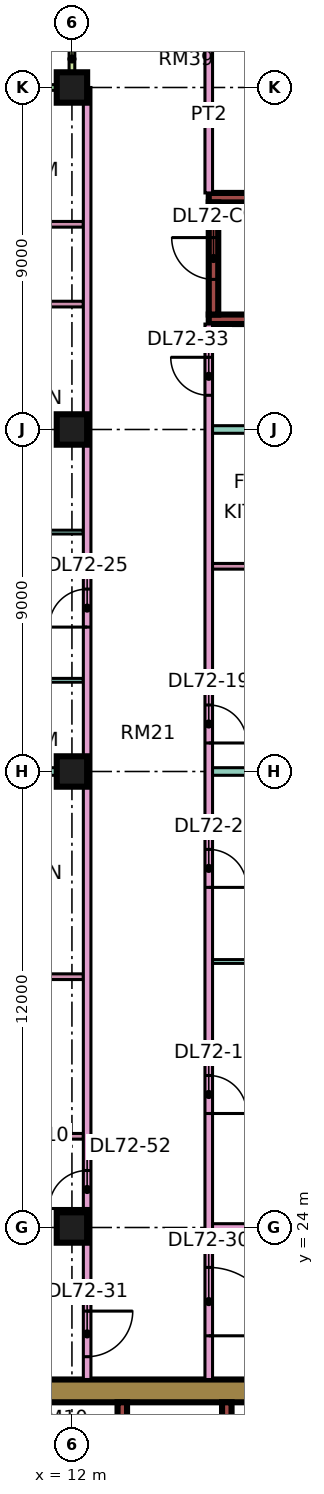
"""IFC4 building model, lengths in metres.
Left out: names, types, materials, properties, quantities, classifications, styles, units other than length and angle.
Written with IfcOpenShell. Run it as: python <this file> out.ifc"""

import sys

from ifc_helpers import new_model, si_unit, direction, frame, frame_2d, origin, origin_2d, place, context, subcontext, project, spatial, rectangle, extrude, element, fill, save


model = new_model("IFC4")
c1 = context("Model", 3, precision=1e-05, world=origin(), true_north=direction((0.0, 1.0)))
c2 = subcontext(c1, "Body", "Model", "MODEL_VIEW")
j1 = project(units=[si_unit("LENGTHUNIT", "METRE"), si_unit("PLANEANGLEUNIT", "RADIAN")], contexts=[c1])
p1 = place(None, origin())
s1 = spatial("IfcSite", under=j1, at=p1, CompositionType="ELEMENT")
p2 = place(p1, origin())
s2 = spatial("IfcBuilding", under=s1, at=p2, CompositionType="ELEMENT")
p3 = place(p2, frame((0.0, 0.0, 307.15)))
s3 = spatial("IfcBuildingStorey", under=s2, at=p3, CompositionType="ELEMENT", Elevation=307.15)
for number, where, z_axis, x_axis in (
    (1, (12.0, 24.0, 0.0), (0.0, 0.0, 1.0), (1.0, 0.0, 0.0)),
    (2, (12.0, 36.0, 0.0), (0.0, 0.0, 1.0), (1.0, 0.0, 0.0)),
    (3, (12.0, 45.0, 0.0), (0.0, 0.0, 1.0), (1.0, 0.0, 0.0)),
    (4, (12.0, 54.0, 0.0), (0.0, 0.0, 1.0), (1.0, 0.0, 0.0)),
):
    element("IfcColumn", number, at=place(p3, frame(where, z_axis=z_axis, x_axis=x_axis)), inside=s3, PredefinedType="COLUMN", context=c2, shape_type="SweptSolid", body=[
        extrude(rectangle(XDim=0.8, YDim=0.8, at=origin_2d()), origin(), (0.0, 0.0, 1.0), 3.75),
    ])
p4 = place(p3, frame((9.0, 19.7, 0.0), z_axis=(0.0, 0.0, 1.0), x_axis=(1.0, 0.0, 0.0)))
e5 = element("IfcWall", 5, at=p4, inside=s3, PredefinedType="SHEAR", context=c2, shape_type="SweptSolid", body=[
    extrude(rectangle(XDim=25.0, YDim=0.6, at=frame_2d((12.5, 0.0))), origin(), (0.0, 0.0, 1.0), 3.75),
])
p5 = place(p4, frame((19.1, 0.0, 0.0)))
e6 = element("IfcOpeningElement", 6, at=p5, cuts=e5, PredefinedType="OPENING", context=c2, shape_type="SweptSolid", body=[
    extrude(rectangle(XDim=1.8, YDim=2.4, at=frame_2d((0.9, 1.2))), frame((0.0, 0.31, 0.0), z_axis=(0.0, -1.0, 0.0), x_axis=(1.0, 0.0, 0.0)), (0.0, 0.0, 1.0), 0.62),
])
p6 = place(p3, frame((13.325, 7.6, 0.0), z_axis=(0.0, 0.0, 1.0), x_axis=(0.0, 1.0, 0.0)))
e7 = element("IfcWall", 7, at=p6, inside=s3, PredefinedType="SHEAR", context=c2, shape_type="SweptSolid", body=[
    extrude(rectangle(XDim=11.8, YDim=0.25, at=frame_2d((5.9, 0.0))), origin(), (0.0, 0.0, 1.0), 3.75),
])
p7 = place(p3, frame((16.075, 15.8, 0.0), z_axis=(0.0, 0.0, 1.0), x_axis=(0.0, 1.0, 0.0)))
e8 = element("IfcWall", 8, at=p7, inside=s3, PredefinedType="SHEAR", context=c2, shape_type="SweptSolid", body=[
    extrude(rectangle(XDim=3.6, YDim=0.25, at=frame_2d((1.8, 0.0))), origin(), (0.0, 0.0, 1.0), 3.75),
])
for number, where, z_axis, x_axis in (
    (9, (15.6, 47.9, 0.0), (0.0, 0.0, 1.0), (1.0, 0.0, 0.0)),
    (10, (15.6, 51.1, 0.0), (0.0, 0.0, 1.0), (1.0, 0.0, 0.0)),
):
    element("IfcWall", number, at=place(p3, frame(where, z_axis=z_axis, x_axis=x_axis)), inside=s3, PredefinedType="SHEAR", context=c2, shape_type="SweptSolid", body=[
        extrude(rectangle(XDim=7.0, YDim=0.25, at=frame_2d((3.5, 0.0))), origin(), (0.0, 0.0, 1.0), 3.75),
    ])
p8 = place(p3, frame((15.725, 48.025, 0.0), z_axis=(0.0, 0.0, 1.0), x_axis=(0.0, 1.0, 0.0)))
e11 = element("IfcWall", 11, at=p8, inside=s3, PredefinedType="SHEAR", context=c2, shape_type="SweptSolid", body=[
    extrude(rectangle(XDim=2.95, YDim=0.25, at=frame_2d((1.475, 0.0))), origin(), (0.0, 0.0, 1.0), 3.75),
])
p9 = place(p8, frame((0.925, 0.0, 0.0)))
e12 = element("IfcOpeningElement", 12, at=p9, cuts=e11, PredefinedType="OPENING", context=c2, shape_type="SweptSolid", body=[
    extrude(rectangle(XDim=1.1, YDim=2.2, at=frame_2d((0.55, 1.1))), frame((0.0, 0.135, 0.0), z_axis=(0.0, -1.0, 0.0), x_axis=(1.0, 0.0, 0.0)), (0.0, 0.0, 1.0), 0.27),
])
p10 = place(p3, frame((11.925, 54.0, 0.0), z_axis=(0.0, 0.0, 1.0), x_axis=(-1.0, 0.0, 0.0)))
e13 = element("IfcWall", 13, at=p10, inside=s3, PredefinedType="SOLIDWALL", context=c2, shape_type="SweptSolid", body=[
    extrude(rectangle(XDim=10.35, YDim=0.15, at=frame_2d((5.175, 0.0))), origin(), (0.0, 0.0, 1.0), 3.35),
])
p11 = place(p10, frame((6.738, 0.0, 0.0)))
e14 = element("IfcOpeningElement", 14, at=p11, cuts=e13, PredefinedType="OPENING", context=c2, shape_type="SweptSolid", body=[
    extrude(rectangle(XDim=1.8, YDim=2.4, at=frame_2d((0.9, 1.2))), frame((0.0, 0.085, 0.0), z_axis=(0.0, -1.0, 0.0), x_axis=(1.0, 0.0, 0.0)), (0.0, 0.0, 1.0), 0.17),
])
p12 = place(p3, frame((12.0, 55.5, 0.0), z_axis=(0.0, 0.0, 1.0), x_axis=(0.0, -1.0, 0.0)))
e15 = element("IfcWall", 15, at=p12, inside=s3, PredefinedType="SOLIDWALL", context=c2, shape_type="SweptSolid", body=[
    extrude(rectangle(XDim=1.5, YDim=0.15, at=frame_2d((0.75, 0.0))), origin(), (0.0, 0.0, 1.0), 3.35),
])
p13 = place(p3, frame((-1.35, 22.4, 0.0), z_axis=(0.0, 0.0, 1.0), x_axis=(1.0, 0.0, 0.0)))
e16 = element("IfcWall", 16, at=p13, inside=s3, PredefinedType="PARTITIONING", context=c2, shape_type="SweptSolid", body=[
    extrude(rectangle(XDim=13.65, YDim=0.2, at=frame_2d((6.825, 0.0))), origin(), (0.0, 0.0, 1.0), 3.35),
])
p14 = place(p3, frame((0.0, 36.0, 0.0), z_axis=(0.0, 0.0, 1.0), x_axis=(1.0, 0.0, 0.0)))
e17 = element("IfcWall", 17, at=p14, inside=s3, PredefinedType="PARTITIONING", context=c2, shape_type="SweptSolid", body=[
    extrude(rectangle(XDim=12.3, YDim=0.2, at=frame_2d((6.15, 0.0))), origin(), (0.0, 0.0, 1.0), 3.35),
])
p15 = place(p3, frame((7.075, 26.4, 0.0), z_axis=(0.0, 0.0, 1.0), x_axis=(1.0, 0.0, 0.0)))
e18 = element("IfcWall", 18, at=p15, inside=s3, PredefinedType="PARTITIONING", context=c2, shape_type="SweptSolid", body=[
    extrude(rectangle(XDim=5.225, YDim=0.15, at=frame_2d((2.613, 0.0))), origin(), (0.0, 0.0, 1.0), 3.35),
])
p16 = place(p15, frame((2.275, 0.0, 0.0)))
e19 = element("IfcOpeningElement", 19, at=p16, cuts=e18, PredefinedType="OPENING", context=c2, shape_type="SweptSolid", body=[
    extrude(rectangle(XDim=0.8, YDim=2.1, at=frame_2d((0.4, 1.05))), frame((0.0, 0.085, 0.0), z_axis=(0.0, -1.0, 0.0), x_axis=(1.0, 0.0, 0.0)), (0.0, 0.0, 1.0), 0.17),
])
p17 = place(p3, frame((7.075, 30.6, 0.0), z_axis=(0.0, 0.0, 1.0), x_axis=(1.0, 0.0, 0.0)))
e20 = element("IfcWall", 20, at=p17, inside=s3, PredefinedType="PARTITIONING", context=c2, shape_type="SweptSolid", body=[
    extrude(rectangle(XDim=5.225, YDim=0.15, at=frame_2d((2.613, 0.0))), origin(), (0.0, 0.0, 1.0), 3.35),
])
for number, where, z_axis, x_axis in (
    (21, (7.075, 38.4, 0.0), (0.0, 0.0, 1.0), (1.0, 0.0, 0.0)),
    (22, (7.075, 42.3, 0.0), (0.0, 0.0, 1.0), (1.0, 0.0, 0.0)),
):
    element("IfcWall", number, at=place(p3, frame(where, z_axis=z_axis, x_axis=x_axis)), inside=s3, PredefinedType="PARTITIONING", context=c2, shape_type="SweptSolid", body=[
        extrude(rectangle(XDim=5.225, YDim=0.1, at=frame_2d((2.613, 0.0))), origin(), (0.0, 0.0, 1.0), 3.35),
    ])
for number, where, z_axis, x_axis in (
    (23, (7.075, 48.3, 0.0), (0.0, 0.0, 1.0), (1.0, 0.0, 0.0)),
    (24, (7.075, 50.4, 0.0), (0.0, 0.0, 1.0), (1.0, 0.0, 0.0)),
):
    element("IfcWall", number, at=place(p3, frame(where, z_axis=z_axis, x_axis=x_axis)), inside=s3, PredefinedType="PARTITIONING", context=c2, shape_type="SweptSolid", body=[
        extrude(rectangle(XDim=5.225, YDim=0.15, at=frame_2d((2.613, 0.0))), origin(), (0.0, 0.0, 1.0), 3.35),
    ])
p18 = place(p3, frame((12.4, 20.0, 0.0), z_axis=(0.0, 0.0, 1.0), x_axis=(0.0, 1.0, 0.0)))
e25 = element("IfcWall", 25, at=p18, inside=s3, PredefinedType="PARTITIONING", context=c2, shape_type="SweptSolid", body=[
    extrude(rectangle(XDim=34.0, YDim=0.2, at=frame_2d((17.0, 0.0))), origin(), (0.0, 0.0, 1.0), 3.35),
])
p19 = place(p18, frame((19.8, 0.0, 0.0)))
e26 = element("IfcOpeningElement", 26, at=p19, cuts=e25, PredefinedType="OPENING", context=c2, shape_type="SweptSolid", body=[
    extrude(rectangle(XDim=1.0, YDim=2.1, at=frame_2d((0.5, 1.05))), frame((0.0, 0.11, 0.0), z_axis=(0.0, -1.0, 0.0), x_axis=(1.0, 0.0, 0.0)), (0.0, 0.0, 1.0), 0.22),
])
p20 = place(p18, frame((0.6, 0.0, 0.0)))
e27 = element("IfcOpeningElement", 27, at=p20, cuts=e25, PredefinedType="OPENING", context=c2, shape_type="SweptSolid", body=[
    extrude(rectangle(XDim=1.2, YDim=2.1, at=frame_2d((0.6, 1.05))), frame((0.0, 0.11, 0.0), z_axis=(0.0, -1.0, 0.0), x_axis=(1.0, 0.0, 0.0)), (0.0, 0.0, 1.0), 0.22),
])
p21 = place(p18, frame((4.5, 0.0, 0.0)))
e28 = element("IfcOpeningElement", 28, at=p21, cuts=e25, PredefinedType="OPENING", context=c2, shape_type="SweptSolid", body=[
    extrude(rectangle(XDim=1.0, YDim=2.1, at=frame_2d((0.5, 1.05))), frame((0.0, 0.11, 0.0), z_axis=(0.0, -1.0, 0.0), x_axis=(1.0, 0.0, 0.0)), (0.0, 0.0, 1.0), 0.22),
])
p22 = place(p3, frame((15.6, 20.0, 0.0), z_axis=(0.0, 0.0, 1.0), x_axis=(0.0, 1.0, 0.0)))
e29 = element("IfcWall", 29, at=p22, inside=s3, PredefinedType="PARTITIONING", context=c2, shape_type="SweptSolid", body=[
    extrude(rectangle(XDim=27.775, YDim=0.2, at=frame_2d((13.887, 0.0))), origin(), (0.0, 0.0, 1.0), 3.35),
])
p23 = place(p22, frame((7.0, 0.0, 0.0)))
e30 = element("IfcOpeningElement", 30, at=p23, cuts=e29, PredefinedType="OPENING", context=c2, shape_type="SweptSolid", body=[
    extrude(rectangle(XDim=1.0, YDim=2.1, at=frame_2d((0.5, 1.05))), frame((0.0, 0.11, 0.0), z_axis=(0.0, -1.0, 0.0), x_axis=(1.0, 0.0, 0.0)), (0.0, 0.0, 1.0), 0.22),
])
p24 = place(p22, frame((12.95, 0.0, 0.0)))
e31 = element("IfcOpeningElement", 31, at=p24, cuts=e29, PredefinedType="OPENING", context=c2, shape_type="SweptSolid", body=[
    extrude(rectangle(XDim=1.0, YDim=2.1, at=frame_2d((0.5, 1.05))), frame((0.0, 0.11, 0.0), z_axis=(0.0, -1.0, 0.0), x_axis=(1.0, 0.0, 0.0)), (0.0, 0.0, 1.0), 0.22),
])
p25 = place(p22, frame((16.75, 0.0, 0.0)))
e32 = element("IfcOpeningElement", 32, at=p25, cuts=e29, PredefinedType="OPENING", context=c2, shape_type="SweptSolid", body=[
    extrude(rectangle(XDim=1.0, YDim=2.1, at=frame_2d((0.5, 1.05))), frame((0.0, 0.11, 0.0), z_axis=(0.0, -1.0, 0.0), x_axis=(1.0, 0.0, 0.0)), (0.0, 0.0, 1.0), 0.22),
])
p26 = place(p22, frame((1.15, 0.0, 0.0)))
e33 = element("IfcOpeningElement", 33, at=p26, cuts=e29, PredefinedType="OPENING", context=c2, shape_type="SweptSolid", body=[
    extrude(rectangle(XDim=1.8, YDim=2.1, at=frame_2d((0.9, 1.05))), frame((0.0, 0.11, 0.0), z_axis=(0.0, -1.0, 0.0), x_axis=(1.0, 0.0, 0.0)), (0.0, 0.0, 1.0), 0.22),
])
p27 = place(p22, frame((25.9, 0.0, 0.0)))
e34 = element("IfcOpeningElement", 34, at=p27, cuts=e29, PredefinedType="OPENING", context=c2, shape_type="SweptSolid", body=[
    extrude(rectangle(XDim=1.0, YDim=2.1, at=frame_2d((0.5, 1.05))), frame((0.0, 0.11, 0.0), z_axis=(0.0, -1.0, 0.0), x_axis=(1.0, 0.0, 0.0)), (0.0, 0.0, 1.0), 0.22),
])
p28 = place(p3, frame((15.6, 51.225, 0.0), z_axis=(0.0, 0.0, 1.0), x_axis=(0.0, 1.0, 0.0)))
e35 = element("IfcWall", 35, at=p28, inside=s3, PredefinedType="PARTITIONING", context=c2, shape_type="SweptSolid", body=[
    extrude(rectangle(XDim=4.125, YDim=0.2, at=frame_2d((2.062, 0.0))), origin(), (0.0, 0.0, 1.0), 3.35),
])
p29 = place(p3, frame((15.7, 24.0, 0.0), z_axis=(0.0, 0.0, 1.0), x_axis=(1.0, 0.0, 0.0)))
e36 = element("IfcWall", 36, at=p29, inside=s3, PredefinedType="PARTITIONING", context=c2, shape_type="SweptSolid", body=[
    extrude(rectangle(XDim=5.8, YDim=0.2, at=frame_2d((2.9, 0.0))), origin(), (0.0, 0.0, 1.0), 3.35),
])
p30 = place(p3, frame((15.7, 31.0, 0.0), z_axis=(0.0, 0.0, 1.0), x_axis=(1.0, 0.0, 0.0)))
e37 = element("IfcWall", 37, at=p30, inside=s3, PredefinedType="PARTITIONING", context=c2, shape_type="SweptSolid", body=[
    extrude(rectangle(XDim=5.8, YDim=0.1, at=frame_2d((2.9, 0.0))), origin(), (0.0, 0.0, 1.0), 3.35),
])
p31 = place(p3, frame((15.7, 36.0, 0.0), z_axis=(0.0, 0.0, 1.0), x_axis=(1.0, 0.0, 0.0)))
e38 = element("IfcWall", 38, at=p31, inside=s3, PredefinedType="PARTITIONING", context=c2, shape_type="SweptSolid", body=[
    extrude(rectangle(XDim=8.3, YDim=0.2, at=frame_2d((4.15, 0.0))), origin(), (0.0, 0.0, 1.0), 3.35),
])
for number, where, z_axis, x_axis in (
    (39, (15.7, 38.4, 0.0), (0.0, 0.0, 1.0), (1.0, 0.0, 0.0)),
    (40, (15.7, 41.4, 0.0), (0.0, 0.0, 1.0), (1.0, 0.0, 0.0)),
):
    element("IfcWall", number, at=place(p3, frame(where, z_axis=z_axis, x_axis=x_axis)), inside=s3, PredefinedType="PARTITIONING", context=c2, shape_type="SweptSolid", body=[
        extrude(rectangle(XDim=2.825, YDim=0.15, at=frame_2d((1.413, 0.0))), origin(), (0.0, 0.0, 1.0), 3.35),
    ])
p32 = place(p3, frame((15.7, 45.0, 0.0), z_axis=(0.0, 0.0, 1.0), x_axis=(1.0, 0.0, 0.0)))
e41 = element("IfcWall", 41, at=p32, inside=s3, PredefinedType="PARTITIONING", context=c2, shape_type="SweptSolid", body=[
    extrude(rectangle(XDim=8.3, YDim=0.2, at=frame_2d((4.15, 0.0))), origin(), (0.0, 0.0, 1.0), 3.35),
])
p33 = place(p9, frame((1.1, 0.0, 0.0), z_axis=(0.0, 0.0, 1.0), x_axis=(-1.0, 0.0, 0.0)))
e42 = element("IfcDoor", 42, at=p33, inside=s3, OperationType="SINGLE_SWING_RIGHT", PredefinedType="DOOR", context=c2, shape_type="SweptSolid", body=[
    extrude(rectangle(XDim=1.1, YDim=2.2, at=frame_2d((0.55, 1.1))), frame((0.0, 0.025, 0.0), z_axis=(0.0, -1.0, 0.0), x_axis=(1.0, 0.0, 0.0)), (0.0, 0.0, 1.0), 0.05),
])
fill(e12, e42)
p34 = place(p23, frame((1.0, 0.0, 0.0), z_axis=(0.0, 0.0, 1.0), x_axis=(-1.0, 0.0, 0.0)))
e43 = element("IfcDoor", 43, at=p34, inside=s3, OperationType="SINGLE_SWING_LEFT", PredefinedType="DOOR", context=c2, shape_type="SweptSolid", body=[
    extrude(rectangle(XDim=1.0, YDim=2.1, at=frame_2d((0.5, 1.05))), frame((0.0, 0.025, 0.0), z_axis=(0.0, -1.0, 0.0), x_axis=(1.0, 0.0, 0.0)), (0.0, 0.0, 1.0), 0.05),
])
fill(e30, e43)
p35 = place(p24, frame((1.0, 0.0, 0.0), z_axis=(0.0, 0.0, 1.0), x_axis=(-1.0, 0.0, 0.0)))
e44 = element("IfcDoor", 44, at=p35, inside=s3, OperationType="SINGLE_SWING_LEFT", PredefinedType="DOOR", context=c2, shape_type="SweptSolid", body=[
    extrude(rectangle(XDim=1.0, YDim=2.1, at=frame_2d((0.5, 1.05))), frame((0.0, 0.025, 0.0), z_axis=(0.0, -1.0, 0.0), x_axis=(1.0, 0.0, 0.0)), (0.0, 0.0, 1.0), 0.05),
])
fill(e31, e44)
p36 = place(p25, frame((1.0, 0.0, 0.0), z_axis=(0.0, 0.0, 1.0), x_axis=(-1.0, 0.0, 0.0)))
e45 = element("IfcDoor", 45, at=p36, inside=s3, OperationType="SINGLE_SWING_LEFT", PredefinedType="DOOR", context=c2, shape_type="SweptSolid", body=[
    extrude(rectangle(XDim=1.0, YDim=2.1, at=frame_2d((0.5, 1.05))), frame((0.0, 0.025, 0.0), z_axis=(0.0, -1.0, 0.0), x_axis=(1.0, 0.0, 0.0)), (0.0, 0.0, 1.0), 0.05),
])
fill(e32, e45)
p37 = place(p19, origin())
e46 = element("IfcDoor", 46, at=p37, inside=s3, OperationType="SINGLE_SWING_LEFT", PredefinedType="DOOR", context=c2, shape_type="SweptSolid", body=[
    extrude(rectangle(XDim=1.0, YDim=2.1, at=frame_2d((0.5, 1.05))), frame((0.0, 0.025, 0.0), z_axis=(0.0, -1.0, 0.0), x_axis=(1.0, 0.0, 0.0)), (0.0, 0.0, 1.0), 0.05),
])
fill(e26, e46)
p38 = place(p26, frame((1.8, 0.0, 0.0), z_axis=(0.0, 0.0, 1.0), x_axis=(-1.0, 0.0, 0.0)))
e47 = element("IfcDoor", 47, at=p38, inside=s3, OperationType="DOUBLE_DOOR_SINGLE_SWING", PredefinedType="DOOR", context=c2, shape_type="SweptSolid", body=[
    extrude(rectangle(XDim=1.8, YDim=2.1, at=frame_2d((0.9, 1.05))), frame((0.0, 0.025, 0.0), z_axis=(0.0, -1.0, 0.0), x_axis=(1.0, 0.0, 0.0)), (0.0, 0.0, 1.0), 0.05),
])
fill(e33, e47)
p39 = place(p20, origin())
e48 = element("IfcDoor", 48, at=p39, inside=s3, OperationType="SINGLE_SWING_RIGHT", PredefinedType="DOOR", context=c2, shape_type="SweptSolid", body=[
    extrude(rectangle(XDim=1.2, YDim=2.1, at=frame_2d((0.6, 1.05))), frame((0.0, 0.025, 0.0), z_axis=(0.0, -1.0, 0.0), x_axis=(1.0, 0.0, 0.0)), (0.0, 0.0, 1.0), 0.05),
])
fill(e27, e48)
p40 = place(p27, frame((1.0, 0.0, 0.0), z_axis=(0.0, 0.0, 1.0), x_axis=(-1.0, 0.0, 0.0)))
e49 = element("IfcDoor", 49, at=p40, inside=s3, OperationType="SINGLE_SWING_RIGHT", PredefinedType="DOOR", context=c2, shape_type="SweptSolid", body=[
    extrude(rectangle(XDim=1.0, YDim=2.1, at=frame_2d((0.5, 1.05))), frame((0.0, 0.025, 0.0), z_axis=(0.0, -1.0, 0.0), x_axis=(1.0, 0.0, 0.0)), (0.0, 0.0, 1.0), 0.05),
])
fill(e34, e49)
p41 = place(p21, origin())
e50 = element("IfcDoor", 50, at=p41, inside=s3, OperationType="SINGLE_SWING_LEFT", PredefinedType="DOOR", context=c2, shape_type="SweptSolid", body=[
    extrude(rectangle(XDim=1.0, YDim=2.1, at=frame_2d((0.5, 1.05))), frame((0.0, 0.025, 0.0), z_axis=(0.0, -1.0, 0.0), x_axis=(1.0, 0.0, 0.0)), (0.0, 0.0, 1.0), 0.05),
])
fill(e28, e50)
save(model, sys.argv[1])
